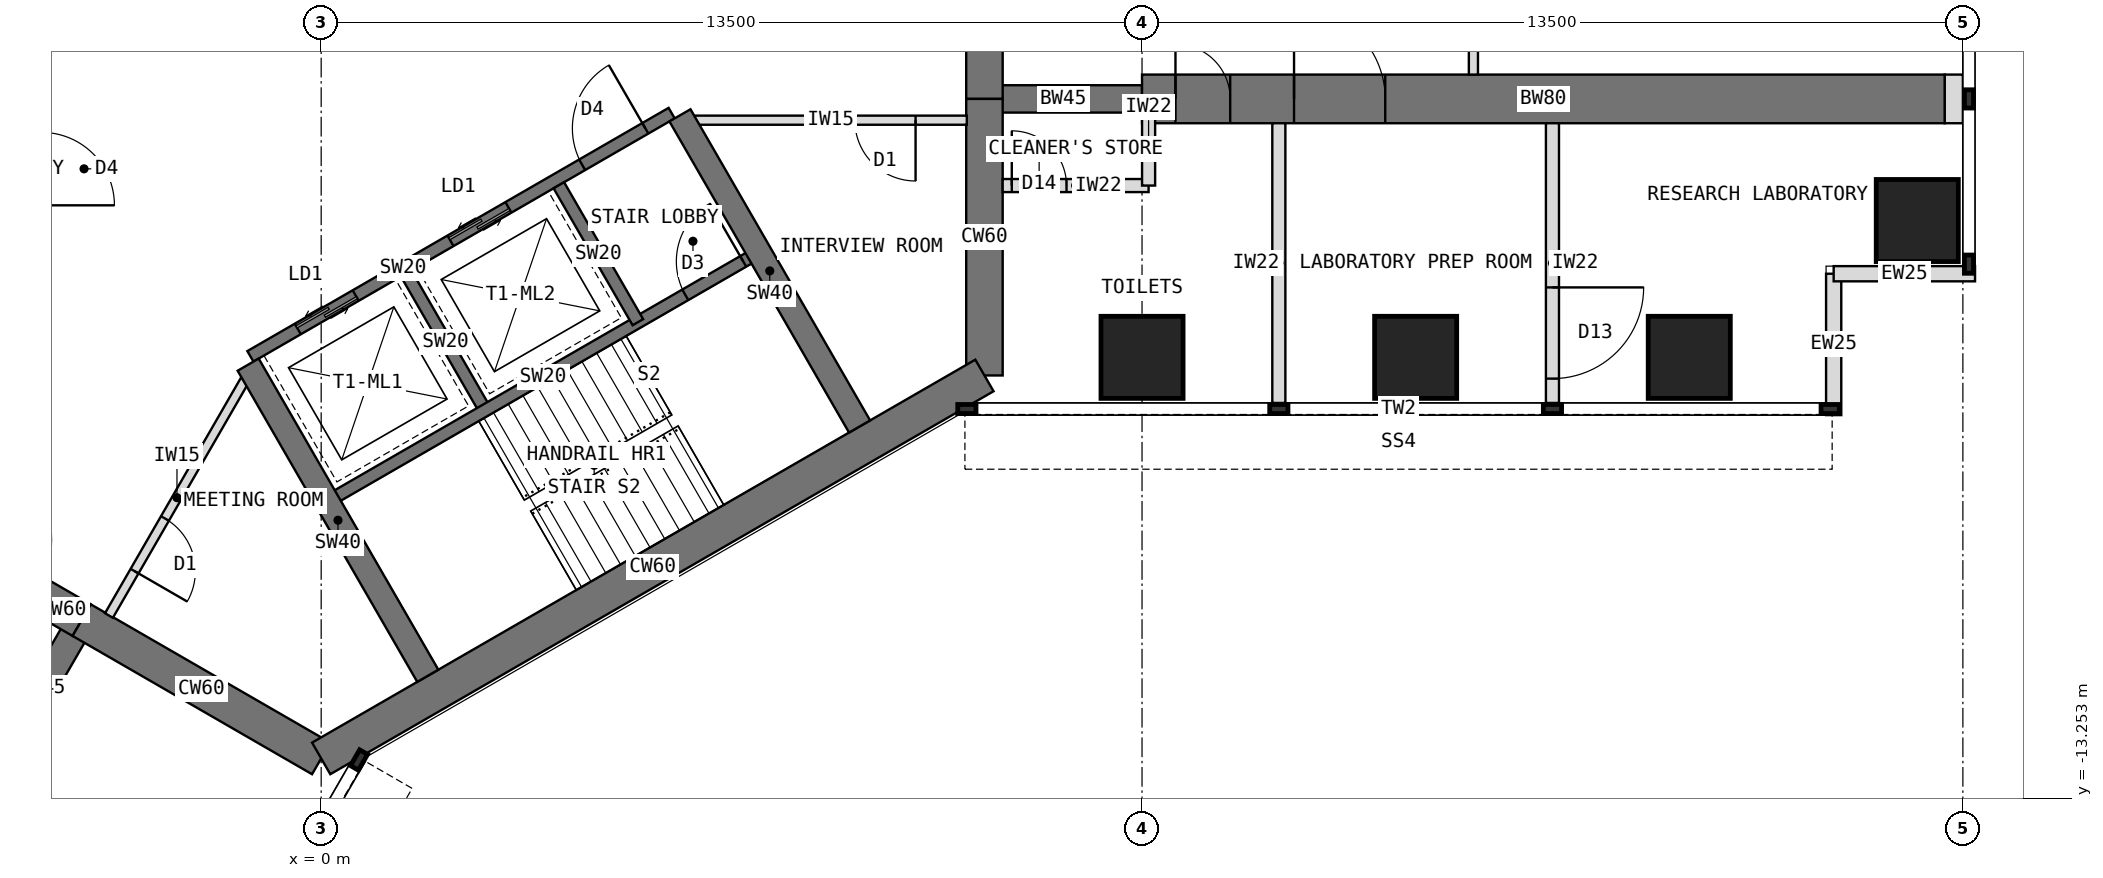
"""IFC4 building model, lengths in metres.
Left out: names, types, materials, properties, quantities, classifications, styles, units other than length and angle.
Written with IfcOpenShell. Run it as: python <this file> out.ifc"""

import sys

from ifc_helpers import new_model, si_unit, direction, frame, frame_2d, origin, origin_2d, place, context, subcontext, project, spatial, rectangle, extrude, element, fill, save


model = new_model("IFC4")
c1 = context("Model", 3, precision=1e-05, world=origin(), true_north=direction((0.0, 1.0)))
c2 = subcontext(c1, "Body", "Model", "MODEL_VIEW")
j1 = project(units=[si_unit("LENGTHUNIT", "METRE"), si_unit("PLANEANGLEUNIT", "RADIAN")], contexts=[c1])
p1 = place(None, origin())
s1 = spatial("IfcSite", under=j1, at=p1, CompositionType="ELEMENT")
p2 = place(p1, origin())
s2 = spatial("IfcBuilding", under=s1, at=p2, CompositionType="ELEMENT")
p3 = place(p2, frame((0.0, 0.0, 113.5)))
s3 = spatial("IfcBuildingStorey", under=s2, at=p3, CompositionType="ELEMENT", Elevation=113.5)
p4 = place(p3, frame((10.908, -6.298, 0.0), z_axis=(0.0, 0.0, 1.0), x_axis=(0.0, 1.0, 0.0)))
e1 = element("IfcWall", 1, at=p4, inside=s3, PredefinedType="SHEAR", context=c2, shape_type="SweptSolid", body=[
    extrude(rectangle(XDim=4.548, YDim=0.6, at=frame_2d((2.274, 0.0))), origin(), (0.0, 0.0, 1.0), 4.0),
])
p5 = place(p3, frame((10.908, -1.75, 0.0), z_axis=(0.0, 0.0, 1.0), x_axis=(0.0, 1.0, 0.0)))
e2 = element("IfcWall", 2, at=p5, inside=s3, PredefinedType="SHEAR", context=c2, shape_type="SweptSolid", body=[
    extrude(rectangle(XDim=3.5, YDim=0.6, at=frame_2d((1.75, 0.0))), origin(), (0.0, 0.0, 1.0), 4.0),
])
p6 = place(p5, frame((0.85, 0.0, 0.0)))
e3 = element("IfcOpeningElement", 3, at=p6, cuts=e2, PredefinedType="OPENING", context=c2, shape_type="SweptSolid", body=[
    extrude(rectangle(XDim=1.8, YDim=2.1, at=frame_2d((0.9, 1.05))), frame((0.0, 0.31, 0.0), z_axis=(0.0, -1.0, 0.0), x_axis=(1.0, 0.0, 0.0)), (0.0, 0.0, 1.0), 0.62),
])
p7 = place(p3, frame((-6.97, -8.572, 0.0), z_axis=(0.0, 0.0, 1.0), x_axis=(0.866019471182, -0.500010275428, 0.0)))
e4 = element("IfcWall", 4, at=p7, inside=s3, PredefinedType="SHEAR", context=c2, shape_type="SweptSolid", body=[
    extrude(rectangle(XDim=3.5, YDim=0.6, at=frame_2d((1.75, 0.0))), origin(), (0.0, 0.0, 1.0), 4.0),
])
p8 = place(p7, frame((0.85, 0.0, 0.0)))
e5 = element("IfcOpeningElement", 5, at=p8, cuts=e4, PredefinedType="OPENING", context=c2, shape_type="SweptSolid", body=[
    extrude(rectangle(XDim=1.8, YDim=2.1, at=frame_2d((0.9, 1.05))), frame((0.0, 0.31, 0.0), z_axis=(0.0, -1.0, 0.0), x_axis=(1.0, 0.0, 0.0)), (0.0, 0.0, 1.0), 0.62),
])
p9 = place(p3, frame((-3.939, -10.322, 0.0), z_axis=(0.0, 0.0, 1.0), x_axis=(0.866011268655, -0.500024481964, 0.0)))
e6 = element("IfcWall", 6, at=p9, inside=s3, PredefinedType="SHEAR", context=c2, shape_type="SweptSolid", body=[
    extrude(rectangle(XDim=4.548, YDim=0.6, at=frame_2d((2.274, 0.0))), origin(), (0.0, 0.0, 1.0), 4.0),
])
p10 = place(p3, frame((0.0, -12.596, 0.0), z_axis=(0.0, 0.0, 1.0), x_axis=(0.866021940709, 0.500005998175, 0.0)))
e7 = element("IfcWall", 7, at=p10, inside=s3, PredefinedType="SHEAR", context=c2, shape_type="SweptSolid", body=[
    extrude(rectangle(XDim=12.596, YDim=0.6, at=frame_2d((6.298, 0.0))), origin(), (0.0, 0.0, 1.0), 4.0),
])
p11 = place(p3, frame((10.908, -1.75, 0.0), z_axis=(0.0, 0.0, 1.0), x_axis=(1.0, 0.0, 0.0)))
e8 = element("IfcWall", 8, at=p11, inside=s3, PredefinedType="SHEAR", context=c2, shape_type="SweptSolid", body=[
    extrude(rectangle(XDim=2.592, YDim=0.45, at=frame_2d((1.296, 0.0))), origin(), (0.0, 0.0, 1.0), 4.0),
])
p12 = place(p3, frame((13.5, -1.75, 0.0), z_axis=(0.0, 0.0, 1.0), x_axis=(1.0, 0.0, 0.0)))
e9 = element("IfcWall", 9, at=p12, inside=s3, PredefinedType="SHEAR", context=c2, shape_type="SweptSolid", body=[
    extrude(rectangle(XDim=13.2, YDim=0.8, at=frame_2d((6.6, 0.0))), origin(), (0.0, 0.0, 1.0), 4.0),
])
p13 = place(p12, frame((0.55, 0.0, 0.0)))
e10 = element("IfcOpeningElement", 10, at=p13, cuts=e9, PredefinedType="OPENING", context=c2, shape_type="SweptSolid", body=[
    extrude(rectangle(XDim=0.9, YDim=2.1, at=frame_2d((0.45, 1.05))), frame((0.0, 0.41, 0.0), z_axis=(0.0, -1.0, 0.0), x_axis=(1.0, 0.0, 0.0)), (0.0, 0.0, 1.0), 0.82),
])
p14 = place(p12, frame((2.5, 0.0, 0.0)))
e11 = element("IfcOpeningElement", 11, at=p14, cuts=e9, PredefinedType="OPENING", context=c2, shape_type="SweptSolid", body=[
    extrude(rectangle(XDim=1.5, YDim=2.1, at=frame_2d((0.75, 1.05))), frame((0.0, 0.41, 0.0), z_axis=(0.0, -1.0, 0.0), x_axis=(1.0, 0.0, 0.0)), (0.0, 0.0, 1.0), 0.82),
])
p15 = place(p3, frame((-3.939, -10.322, 0.0), z_axis=(0.0, 0.0, 1.0), x_axis=(-0.499918158782, -0.866072649678, 0.0)))
e12 = element("IfcWall", 12, at=p15, inside=s3, PredefinedType="SHEAR", context=c2, shape_type="SweptSolid", body=[
    extrude(rectangle(XDim=2.592, YDim=0.45, at=frame_2d((1.296, 0.0))), origin(), (0.0, 0.0, 1.0), 4.0),
])
for number, where, z_axis, x_axis in (
    (13, (13.5, -6.0, 0.0), (0.0, 0.0, 1.0), (1.0, 0.0, 0.0)),
    (14, (18.0, -6.0, 0.0), (0.0, 0.0, 1.0), (1.0, 0.0, 0.0)),
    (15, (22.5, -6.0, 0.0), (0.0, 0.0, 1.0), (1.0, 0.0, 0.0)),
    (16, (26.25, -3.75, 0.0), (0.0, 0.0, 1.0), (1.0, 0.0, 0.0)),
):
    element("IfcColumn", number, at=place(p3, frame(where, z_axis=z_axis, x_axis=x_axis)), inside=s3, PredefinedType="COLUMN", context=c2, shape_type="SweptSolid", body=[
        extrude(rectangle(XDim=1.35, YDim=1.35, at=origin_2d()), origin(), (0.0, 0.0, 1.0), 4.0),
    ])
for number, where, z_axis, x_axis in (
    (17, (24.875, -6.95, 0.0), (0.0, 0.0, 1.0), (0.0, 1.0, 0.0)),
    (18, (24.875, -4.625, 0.0), (0.0, 0.0, 1.0), (1.0, 0.0, 0.0)),
):
    element("IfcWall", number, at=place(p3, frame(where, z_axis=z_axis, x_axis=x_axis)), inside=s3, PredefinedType="STANDARD", context=c2, shape_type="SweptSolid", body=[
        extrude(rectangle(XDim=2.325, YDim=0.25, at=frame_2d((1.163, 0.0))), origin(), (0.0, 0.0, 1.0), 3.8),
    ])
p16 = place(p3, frame((26.7, -1.75, 0.0), z_axis=(0.0, 0.0, 1.0), x_axis=(1.0, 0.0, 0.0)))
e19 = element("IfcWall", 19, at=p16, inside=s3, PredefinedType="PARTITIONING", context=c2, shape_type="SweptSolid", body=[
    extrude(rectangle(XDim=0.3, YDim=0.8, at=frame_2d((0.15, 0.0))), origin(), (0.0, 0.0, 1.0), 3.8),
])
p17 = place(p3, frame((-1.164, -5.984, 0.0), z_axis=(0.0, 0.0, 1.0), x_axis=(0.866026010844, 0.49999894854, 0.0)))
e20 = element("IfcWall", 20, at=p17, inside=s3, PredefinedType="SHEAR", context=c2, shape_type="SweptSolid", body=[
    extrude(rectangle(XDim=8.0, YDim=0.2, at=frame_2d((4.0, 0.0))), origin(), (0.0, 0.0, 1.0), 4.0),
])
p18 = place(p17, frame((6.3, 0.0, 0.0)))
e21 = element("IfcOpeningElement", 21, at=p18, cuts=e20, PredefinedType="OPENING", context=c2, shape_type="SweptSolid", body=[
    extrude(rectangle(XDim=1.2, YDim=2.1, at=frame_2d((0.6, 1.05))), frame((0.0, 0.11, 0.0), z_axis=(0.0, -1.0, 0.0), x_axis=(1.0, 0.0, 0.0)), (0.0, 0.0, 1.0), 0.22),
])
p19 = place(p17, frame((0.9, 0.0, 0.0)))
e22 = element("IfcOpeningElement", 22, at=p19, cuts=e20, PredefinedType="OPENING", context=c2, shape_type="SweptSolid", body=[
    extrude(rectangle(XDim=1.1, YDim=2.2, at=frame_2d((0.55, 1.1))), frame((0.0, 0.11, 0.0), z_axis=(0.0, -1.0, 0.0), x_axis=(1.0, 0.0, 0.0)), (0.0, 0.0, 1.0), 0.22),
])
p20 = place(p17, frame((3.8, 0.0, 0.0)))
e23 = element("IfcOpeningElement", 23, at=p20, cuts=e20, PredefinedType="OPENING", context=c2, shape_type="SweptSolid", body=[
    extrude(rectangle(XDim=1.1, YDim=2.2, at=frame_2d((0.55, 1.1))), frame((0.0, 0.11, 0.0), z_axis=(0.0, -1.0, 0.0), x_axis=(1.0, 0.0, 0.0)), (0.0, 0.0, 1.0), 0.22),
])
p21 = place(p3, frame((1.397, -4.62, 0.0), z_axis=(0.0, 0.0, 1.0), x_axis=(0.499936506574, -0.866062058628, 0.0)))
e24 = element("IfcWall", 24, at=p21, inside=s3, PredefinedType="SHEAR", context=c2, shape_type="SweptSolid", body=[
    extrude(rectangle(XDim=2.6, YDim=0.2, at=frame_2d((1.3, 0.0))), origin(), (0.0, 0.0, 1.0), 4.0),
])
p22 = place(p3, frame((3.909, -3.17, 0.0), z_axis=(0.0, 0.0, 1.0), x_axis=(0.49997716683, -0.86603858612, 0.0)))
e25 = element("IfcWall", 25, at=p22, inside=s3, PredefinedType="SHEAR", context=c2, shape_type="SweptSolid", body=[
    extrude(rectangle(XDim=2.6, YDim=0.2, at=frame_2d((1.3, 0.0))), origin(), (0.0, 0.0, 1.0), 4.0),
])
p23 = place(p3, frame((0.186, -8.322, 0.0), z_axis=(0.0, 0.0, 1.0), x_axis=(0.866026010844, 0.49999894854, 0.0)))
e26 = element("IfcWall", 26, at=p23, inside=s3, PredefinedType="SHEAR", context=c2, shape_type="SweptSolid", body=[
    extrude(rectangle(XDim=8.0, YDim=0.2, at=frame_2d((4.0, 0.0))), origin(), (0.0, 0.0, 1.0), 4.0),
])
p24 = place(p23, frame((6.7, 0.0, 0.0)))
e27 = element("IfcOpeningElement", 27, at=p24, cuts=e26, PredefinedType="OPENING", context=c2, shape_type="SweptSolid", body=[
    extrude(rectangle(XDim=1.1, YDim=2.1, at=frame_2d((0.55, 1.05))), frame((0.0, 0.11, 0.0), z_axis=(0.0, -1.0, 0.0), x_axis=(1.0, 0.0, 0.0)), (0.0, 0.0, 1.0), 0.22),
])
p25 = place(p3, frame((5.901, -2.02, 0.0), z_axis=(0.0, 0.0, 1.0), x_axis=(0.500027676417, -0.866009424208, 0.0)))
e28 = element("IfcWall", 28, at=p25, inside=s3, PredefinedType="SHEAR", context=c2, shape_type="SweptSolid", body=[
    extrude(rectangle(XDim=5.908, YDim=0.4, at=frame_2d((2.954, 0.0))), origin(), (0.0, 0.0, 1.0), 4.0),
])
p26 = place(p3, frame((-1.201, -6.12, 0.0), z_axis=(0.0, 0.0, 1.0), x_axis=(0.49999668571, -0.866027317282, 0.0)))
e29 = element("IfcWall", 29, at=p26, inside=s3, PredefinedType="SHEAR", context=c2, shape_type="SweptSolid", body=[
    extrude(rectangle(XDim=5.908, YDim=0.4, at=frame_2d((2.954, 0.0))), origin(), (0.0, 0.0, 1.0), 4.0),
])
p27 = place(p3, frame((15.75, -2.15, 0.0), z_axis=(0.0, 0.0, 1.0), x_axis=(0.0, -1.0, 0.0)))
e30 = element("IfcWall", 30, at=p27, inside=s3, PredefinedType="PARTITIONING", context=c2, shape_type="SweptSolid", body=[
    extrude(rectangle(XDim=4.6, YDim=0.215, at=frame_2d((2.3, 0.0))), origin(), (0.0, 0.0, 1.0), 3.8),
])
p28 = place(p3, frame((20.25, -2.15, 0.0), z_axis=(0.0, 0.0, 1.0), x_axis=(0.0, -1.0, 0.0)))
e31 = element("IfcWall", 31, at=p28, inside=s3, PredefinedType="PARTITIONING", context=c2, shape_type="SweptSolid", body=[
    extrude(rectangle(XDim=4.6, YDim=0.215, at=frame_2d((2.3, 0.0))), origin(), (0.0, 0.0, 1.0), 3.8),
])
p29 = place(p28, frame((2.7, 0.0, 0.0)))
e32 = element("IfcOpeningElement", 32, at=p29, cuts=e31, PredefinedType="OPENING", context=c2, shape_type="SweptSolid", body=[
    extrude(rectangle(XDim=1.5, YDim=2.1, at=frame_2d((0.75, 1.05))), frame((0.0, 0.117, 0.0), z_axis=(0.0, -1.0, 0.0), x_axis=(1.0, 0.0, 0.0)), (0.0, 0.0, 1.0), 0.235),
])
p30 = place(p3, frame((11.208, -3.175, 0.0), z_axis=(0.0, 0.0, 1.0), x_axis=(1.0, 0.0, 0.0)))
e33 = element("IfcWall", 33, at=p30, inside=s3, PredefinedType="PARTITIONING", context=c2, shape_type="SweptSolid", body=[
    extrude(rectangle(XDim=2.4, YDim=0.215, at=frame_2d((1.2, 0.0))), origin(), (0.0, 0.0, 1.0), 3.8),
])
p31 = place(p30, frame((0.15, 0.0, 0.0)))
e34 = element("IfcOpeningElement", 34, at=p31, cuts=e33, PredefinedType="OPENING", context=c2, shape_type="SweptSolid", body=[
    extrude(rectangle(XDim=0.9, YDim=2.1, at=frame_2d((0.45, 1.05))), frame((0.0, 0.117, 0.0), z_axis=(0.0, -1.0, 0.0), x_axis=(1.0, 0.0, 0.0)), (0.0, 0.0, 1.0), 0.235),
])
p32 = place(p3, frame((13.608, -1.975, 0.0), z_axis=(0.0, 0.0, 1.0), x_axis=(0.0, -1.0, 0.0)))
e35 = element("IfcWall", 35, at=p32, inside=s3, PredefinedType="PARTITIONING", context=c2, shape_type="SweptSolid", body=[
    extrude(rectangle(XDim=1.2, YDim=0.215, at=frame_2d((0.6, 0.0))), origin(), (0.0, 0.0, 1.0), 3.8),
])
p33 = place(p3, frame((-1.253, -6.37, 0.0), z_axis=(0.0, 0.0, 1.0), x_axis=(-0.499999473313, -0.866025707867, 0.0)))
e36 = element("IfcWall", 36, at=p33, inside=s3, PredefinedType="PARTITIONING", context=c2, shape_type="SweptSolid", body=[
    extrude(rectangle(XDim=4.476, YDim=0.15, at=frame_2d((2.238, 0.0))), origin(), (0.0, 0.0, 1.0), 3.8),
])
p34 = place(p33, frame((2.633, 0.0, 0.0)))
e37 = element("IfcOpeningElement", 37, at=p34, cuts=e36, PredefinedType="OPENING", context=c2, shape_type="SweptSolid", body=[
    extrude(rectangle(XDim=1.0, YDim=2.1, at=frame_2d((0.5, 1.05))), frame((0.0, 0.085, 0.0), z_axis=(0.0, -1.0, 0.0), x_axis=(1.0, 0.0, 0.0)), (0.0, 0.0, 1.0), 0.17),
])
p35 = place(p3, frame((10.618, -2.1, 0.0), z_axis=(0.0, 0.0, 1.0), x_axis=(-1.0, 0.0, 0.0)))
e38 = element("IfcWall", 38, at=p35, inside=s3, PredefinedType="PARTITIONING", context=c2, shape_type="SweptSolid", body=[
    extrude(rectangle(XDim=4.476, YDim=0.15, at=frame_2d((2.238, 0.0))), origin(), (0.0, 0.0, 1.0), 3.8),
])
p36 = place(p35, frame((0.843, 0.0, 0.0)))
e39 = element("IfcOpeningElement", 39, at=p36, cuts=e38, PredefinedType="OPENING", context=c2, shape_type="SweptSolid", body=[
    extrude(rectangle(XDim=1.0, YDim=2.1, at=frame_2d((0.5, 1.05))), frame((0.0, 0.085, 0.0), z_axis=(0.0, -1.0, 0.0), x_axis=(1.0, 0.0, 0.0)), (0.0, 0.0, 1.0), 0.17),
])
p37 = place(p3, frame((18.95, -1.35, 0.0), z_axis=(0.0, 0.0, 1.0), x_axis=(0.0, 1.0, 0.0)))
e40 = element("IfcWall", 40, at=p37, inside=s3, PredefinedType="PARTITIONING", context=c2, shape_type="SweptSolid", body=[
    extrude(rectangle(XDim=2.7, YDim=0.15, at=frame_2d((1.35, 0.0))), origin(), (0.0, 0.0, 1.0), 3.8),
])
p38 = place(p37, frame((0.85, 0.0, 0.0)))
e41 = element("IfcOpeningElement", 41, at=p38, cuts=e40, PredefinedType="OPENING", context=c2, shape_type="SweptSolid", body=[
    extrude(rectangle(XDim=1.0, YDim=2.1, at=frame_2d((0.5, 1.05))), frame((0.0, 0.085, 0.0), z_axis=(0.0, -1.0, 0.0), x_axis=(1.0, 0.0, 0.0)), (0.0, 0.0, 1.0), 0.17),
])
p39 = place(p18, origin())
e42 = element("IfcDoor", 42, at=p39, inside=s3, OperationType="SINGLE_SWING_RIGHT", PredefinedType="DOOR", context=c2, shape_type="SweptSolid", body=[
    extrude(rectangle(XDim=1.2, YDim=2.1, at=frame_2d((0.6, 1.05))), frame((0.0, 0.025, 0.0), z_axis=(0.0, -1.0, 0.0), x_axis=(1.0, 0.0, 0.0)), (0.0, 0.0, 1.0), 0.05),
])
fill(e21, e42)
p40 = place(p19, origin())
e43 = element("IfcDoor", 43, at=p40, inside=s3, OperationType="DOUBLE_DOOR_SLIDING", PredefinedType="DOOR", context=c2, shape_type="SweptSolid", body=[
    extrude(rectangle(XDim=1.1, YDim=2.2, at=frame_2d((0.55, 1.1))), frame((0.0, 0.025, 0.0), z_axis=(0.0, -1.0, 0.0), x_axis=(1.0, 0.0, 0.0)), (0.0, 0.0, 1.0), 0.05),
])
fill(e22, e43)
p41 = place(p20, origin())
e44 = element("IfcDoor", 44, at=p41, inside=s3, OperationType="DOUBLE_DOOR_SLIDING", PredefinedType="DOOR", context=c2, shape_type="SweptSolid", body=[
    extrude(rectangle(XDim=1.1, YDim=2.2, at=frame_2d((0.55, 1.1))), frame((0.0, 0.025, 0.0), z_axis=(0.0, -1.0, 0.0), x_axis=(1.0, 0.0, 0.0)), (0.0, 0.0, 1.0), 0.05),
])
fill(e23, e44)
p42 = place(p24, origin())
e45 = element("IfcDoor", 45, at=p42, inside=s3, OperationType="SINGLE_SWING_RIGHT", PredefinedType="DOOR", context=c2, shape_type="SweptSolid", body=[
    extrude(rectangle(XDim=1.1, YDim=2.1, at=frame_2d((0.55, 1.05))), frame((0.0, 0.025, 0.0), z_axis=(0.0, -1.0, 0.0), x_axis=(1.0, 0.0, 0.0)), (0.0, 0.0, 1.0), 0.05),
])
fill(e27, e45)
p43 = place(p29, origin())
e46 = element("IfcDoor", 46, at=p43, inside=s3, OperationType="DOUBLE_DOOR_SINGLE_SWING", PredefinedType="DOOR", context=c2, shape_type="SweptSolid", body=[
    extrude(rectangle(XDim=1.5, YDim=2.1, at=frame_2d((0.75, 1.05))), frame((0.0, 0.025, 0.0), z_axis=(0.0, -1.0, 0.0), x_axis=(1.0, 0.0, 0.0)), (0.0, 0.0, 1.0), 0.05),
])
fill(e32, e46)
p44 = place(p31, origin())
e47 = element("IfcDoor", 47, at=p44, inside=s3, OperationType="SINGLE_SWING_LEFT", PredefinedType="DOOR", context=c2, shape_type="SweptSolid", body=[
    extrude(rectangle(XDim=0.9, YDim=2.1, at=frame_2d((0.45, 1.05))), frame((0.0, 0.025, 0.0), z_axis=(0.0, -1.0, 0.0), x_axis=(1.0, 0.0, 0.0)), (0.0, 0.0, 1.0), 0.05),
])
fill(e34, e47)
p45 = place(p34, origin())
e48 = element("IfcDoor", 48, at=p45, inside=s3, OperationType="SINGLE_SWING_RIGHT", PredefinedType="DOOR", context=c2, shape_type="SweptSolid", body=[
    extrude(rectangle(XDim=1.0, YDim=2.1, at=frame_2d((0.5, 1.05))), frame((0.0, 0.025, 0.0), z_axis=(0.0, -1.0, 0.0), x_axis=(1.0, 0.0, 0.0)), (0.0, 0.0, 1.0), 0.05),
])
fill(e37, e48)
p46 = place(p36, origin())
e49 = element("IfcDoor", 49, at=p46, inside=s3, OperationType="SINGLE_SWING_LEFT", PredefinedType="DOOR", context=c2, shape_type="SweptSolid", body=[
    extrude(rectangle(XDim=1.0, YDim=2.1, at=frame_2d((0.5, 1.05))), frame((0.0, 0.025, 0.0), z_axis=(0.0, -1.0, 0.0), x_axis=(1.0, 0.0, 0.0)), (0.0, 0.0, 1.0), 0.05),
])
fill(e39, e49)
p47 = place(p13, origin())
e50 = element("IfcDoor", 50, at=p47, inside=s3, OperationType="SINGLE_SWING_LEFT", PredefinedType="DOOR", context=c2, shape_type="SweptSolid", body=[
    extrude(rectangle(XDim=0.82, YDim=2.06, at=frame_2d((0.45, 1.03))), frame((0.0, 0.025, 0.0), z_axis=(0.0, -1.0, 0.0), x_axis=(1.0, 0.0, 0.0)), (0.0, 0.0, 1.0), 0.05),
    extrude(rectangle(XDim=0.04, YDim=2.1, at=frame_2d((0.02, 1.05))), frame((0.0, 0.4, 0.0), z_axis=(0.0, -1.0, 0.0), x_axis=(1.0, 0.0, 0.0)), (0.0, 0.0, 1.0), 0.8),
    extrude(rectangle(XDim=0.04, YDim=2.1, at=frame_2d((0.88, 1.05))), frame((0.0, 0.4, 0.0), z_axis=(0.0, -1.0, 0.0), x_axis=(1.0, 0.0, 0.0)), (0.0, 0.0, 1.0), 0.8),
    extrude(rectangle(XDim=0.82, YDim=0.04, at=frame_2d((0.45, 2.08))), frame((0.0, 0.4, 0.0), z_axis=(0.0, -1.0, 0.0), x_axis=(1.0, 0.0, 0.0)), (0.0, 0.0, 1.0), 0.8),
])
fill(e10, e50)
p48 = place(p14, origin())
e51 = element("IfcDoor", 51, at=p48, inside=s3, OperationType="DOUBLE_DOOR_SINGLE_SWING", PredefinedType="DOOR", context=c2, shape_type="SweptSolid", body=[
    extrude(rectangle(XDim=1.42, YDim=2.06, at=frame_2d((0.75, 1.03))), frame((0.0, 0.025, 0.0), z_axis=(0.0, -1.0, 0.0), x_axis=(1.0, 0.0, 0.0)), (0.0, 0.0, 1.0), 0.05),
    extrude(rectangle(XDim=0.04, YDim=2.1, at=frame_2d((0.02, 1.05))), frame((0.0, 0.4, 0.0), z_axis=(0.0, -1.0, 0.0), x_axis=(1.0, 0.0, 0.0)), (0.0, 0.0, 1.0), 0.8),
    extrude(rectangle(XDim=0.04, YDim=2.1, at=frame_2d((1.48, 1.05))), frame((0.0, 0.4, 0.0), z_axis=(0.0, -1.0, 0.0), x_axis=(1.0, 0.0, 0.0)), (0.0, 0.0, 1.0), 0.8),
    extrude(rectangle(XDim=1.42, YDim=0.04, at=frame_2d((0.75, 2.08))), frame((0.0, 0.4, 0.0), z_axis=(0.0, -1.0, 0.0), x_axis=(1.0, 0.0, 0.0)), (0.0, 0.0, 1.0), 0.8),
])
fill(e11, e51)
save(model, sys.argv[1])
